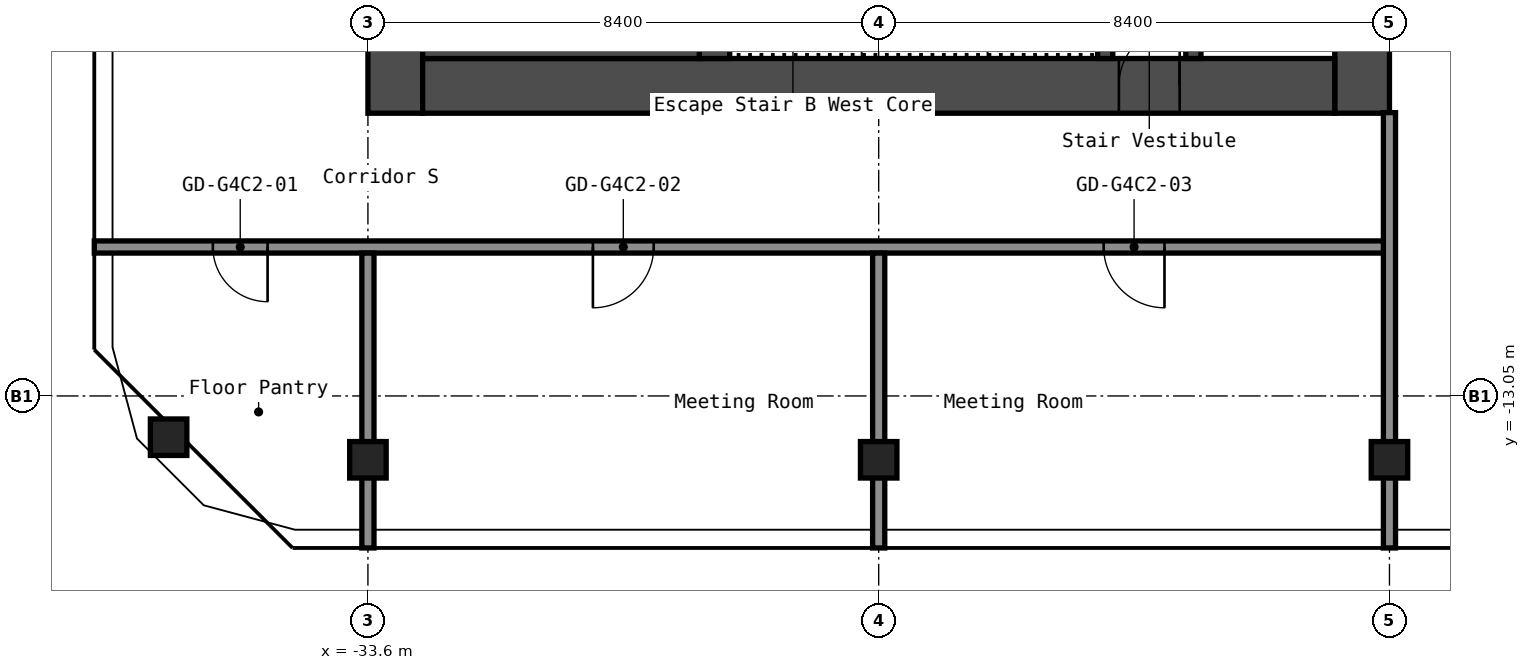
"""IFC4 building model, lengths in metres.
Left out: names, types, materials, properties, quantities, classifications, styles, units other than length and angle.
Written with IfcOpenShell. Run it as: python <this file> out.ifc"""

import sys

from ifc_helpers import new_model, si_unit, direction, frame, frame_2d, origin, origin_2d, place, context, subcontext, project, spatial, rectangle, hollow_rectangle, extrude, element, fill, save


model = new_model("IFC4")
c1 = context("Model", 3, precision=1e-05, world=origin(), true_north=direction((0.0, 1.0)))
c2 = subcontext(c1, "Body", "Model", "MODEL_VIEW")
j1 = project(units=[si_unit("LENGTHUNIT", "METRE"), si_unit("PLANEANGLEUNIT", "RADIAN")], contexts=[c1])
p1 = place(None, origin())
s1 = spatial("IfcSite", under=j1, at=p1, CompositionType="ELEMENT")
p2 = place(p1, origin())
s2 = spatial("IfcBuilding", under=s1, at=p2, CompositionType="ELEMENT")
p3 = place(p2, frame((0.0, 0.0, 225.0)))
s3 = spatial("IfcBuildingStorey", under=s2, at=p3, CompositionType="ELEMENT", Elevation=225.0)
for number, where, z_axis, x_axis in (
    (1, (-36.878, -13.729, 0.0), (0.0, 0.0, 1.0), (1.0, 0.0, 0.0)),
    (2, (-33.6, -14.1, 0.0), (0.0, 0.0, 1.0), (1.0, 0.0, 0.0)),
    (3, (-25.2, -14.1, 0.0), (0.0, 0.0, 1.0), (1.0, 0.0, 0.0)),
    (4, (-16.8, -14.1, 0.0), (0.0, 0.0, 1.0), (1.0, 0.0, 0.0)),
):
    element("IfcColumn", number, at=place(p3, frame(where, z_axis=z_axis, x_axis=x_axis)), inside=s3, PredefinedType="COLUMN", context=c2, shape_type="SweptSolid", body=[
        extrude(hollow_rectangle(XDim=0.6, YDim=0.6, WallThickness=0.025, InnerFilletRadius=0.038, OuterFilletRadius=0.062, at=origin_2d()), origin(), (0.0, 0.0, 1.0), 2.9),
    ])
p4 = place(p3, frame((-17.25, -8.4, 0.0), z_axis=(0.0, 0.0, 1.0), x_axis=(0.0, 1.0, 0.0)))
e5 = element("IfcWall", 5, at=p4, inside=s3, PredefinedType="SHEAR", context=c2, shape_type="SweptSolid", body=[
    extrude(rectangle(XDim=16.8, YDim=0.9, at=frame_2d((8.4, 0.0))), origin(), (0.0, 0.0, 1.0), 2.9),
])
p5 = place(p4, frame((10.1, 0.0, 0.0)))
e6 = element("IfcOpeningElement", 6, at=p5, cuts=e5, PredefinedType="OPENING", context=c2, shape_type="SweptSolid", body=[
    extrude(rectangle(XDim=1.6, YDim=2.1, at=frame_2d((0.8, 1.05))), frame((0.0, 0.46, 0.0), z_axis=(0.0, -1.0, 0.0), x_axis=(1.0, 0.0, 0.0)), (0.0, 0.0, 1.0), 0.92),
])
p6 = place(p3, frame((-33.15, -8.4, 0.0), z_axis=(0.0, 0.0, 1.0), x_axis=(0.0, 1.0, 0.0)))
e7 = element("IfcWall", 7, at=p6, inside=s3, PredefinedType="SHEAR", context=c2, shape_type="SweptSolid", body=[
    extrude(rectangle(XDim=16.8, YDim=0.9, at=frame_2d((8.4, 0.0))), origin(), (0.0, 0.0, 1.0), 2.9),
])
p7 = place(p3, frame((-32.7, -7.95, 0.0), z_axis=(0.0, 0.0, 1.0), x_axis=(1.0, 0.0, 0.0)))
e8 = element("IfcWall", 8, at=p7, inside=s3, PredefinedType="SHEAR", context=c2, shape_type="SweptSolid", body=[
    extrude(rectangle(XDim=15.0, YDim=0.9, at=frame_2d((7.5, 0.0))), origin(), (0.0, 0.0, 1.0), 2.9),
])
p8 = place(p7, frame((11.45, 0.0, 0.0)))
e9 = element("IfcOpeningElement", 9, at=p8, cuts=e8, PredefinedType="OPENING", context=c2, shape_type="SweptSolid", body=[
    extrude(rectangle(XDim=1.0, YDim=2.1, at=frame_2d((0.5, 1.05))), frame((0.0, 0.46, 0.0), z_axis=(0.0, -1.0, 0.0), x_axis=(1.0, 0.0, 0.0)), (0.0, 0.0, 1.0), 0.92),
])
p9 = place(p3, frame((-20.025, -7.5, 0.0), z_axis=(0.0, 0.0, 1.0), x_axis=(0.0, 1.0, 0.0)))
e10 = element("IfcWall", 10, at=p9, inside=s3, PredefinedType="SHEAR", context=c2, shape_type="SweptSolid", body=[
    extrude(rectangle(XDim=6.3, YDim=0.25, at=frame_2d((3.15, 0.0))), origin(), (0.0, 0.0, 1.0), 2.9),
])
p10 = place(p9, frame((2.4, 0.0, 0.0)))
e11 = element("IfcOpeningElement", 11, at=p10, cuts=e10, PredefinedType="OPENING", context=c2, shape_type="SweptSolid", body=[
    extrude(rectangle(XDim=1.0, YDim=2.1, at=frame_2d((0.5, 1.05))), frame((0.0, 0.135, 0.0), z_axis=(0.0, -1.0, 0.0), x_axis=(1.0, 0.0, 0.0)), (0.0, 0.0, 1.0), 0.27),
])
p11 = place(p3, frame((-21.475, -7.5, 0.0), z_axis=(0.0, 0.0, 1.0), x_axis=(0.0, 1.0, 0.0)))
e12 = element("IfcWall", 12, at=p11, inside=s3, PredefinedType="SHEAR", context=c2, shape_type="SweptSolid", body=[
    extrude(rectangle(XDim=3.75, YDim=0.25, at=frame_2d((1.875, 0.0))), origin(), (0.0, 0.0, 1.0), 2.9),
])
p12 = place(p11, frame((1.3, 0.0, 0.0)))
e13 = element("IfcOpeningElement", 13, at=p12, cuts=e12, PredefinedType="OPENING", context=c2, shape_type="SweptSolid", body=[
    extrude(rectangle(XDim=1.2, YDim=2.1, at=frame_2d((0.6, 1.05))), frame((0.0, 0.135, 0.0), z_axis=(0.0, -1.0, 0.0), x_axis=(1.0, 0.0, 0.0)), (0.0, 0.0, 1.0), 0.27),
])
p13 = place(p3, frame((-27.9, -7.5, 0.0), z_axis=(0.0, 0.0, 1.0), x_axis=(0.0, 1.0, 0.0)))
e14 = element("IfcWall", 14, at=p13, inside=s3, PredefinedType="SHEAR", context=c2, shape_type="SweptSolid", body=[
    extrude(rectangle(XDim=3.75, YDim=0.5, at=frame_2d((1.875, 0.0))), origin(), (0.0, 0.0, 1.0), 2.9),
])
p14 = place(p3, frame((-32.7, -6.75, 0.0), z_axis=(0.0, 0.0, 1.0), x_axis=(1.0, 0.0, 0.0)))
e15 = element("IfcWall", 15, at=p14, inside=s3, PredefinedType="SHEAR", context=c2, shape_type="SweptSolid", body=[
    extrude(rectangle(XDim=4.55, YDim=1.5, at=frame_2d((2.275, 0.0))), origin(), (0.0, 0.0, 1.0), 2.9),
])
p15 = place(p3, frame((-38.1, -10.6, 0.0), z_axis=(0.0, 0.0, 1.0), x_axis=(1.0, 0.0, 0.0)))
e16 = element("IfcWall", 16, at=p15, inside=s3, PredefinedType="PARTITIONING", context=c2, shape_type="SweptSolid", body=[
    extrude(rectangle(XDim=21.3, YDim=0.2, at=frame_2d((10.65, 0.0))), origin(), (0.0, 0.0, 1.0), 2.9),
])
p16 = place(p15, frame((1.95, 0.0, 0.0)))
e17 = element("IfcOpeningElement", 17, at=p16, cuts=e16, PredefinedType="OPENING", context=c2, shape_type="SweptSolid", body=[
    extrude(rectangle(XDim=0.9, YDim=2.1, at=frame_2d((0.45, 1.05))), frame((0.0, 0.11, 0.0), z_axis=(0.0, -1.0, 0.0), x_axis=(1.0, 0.0, 0.0)), (0.0, 0.0, 1.0), 0.22),
])
p17 = place(p15, frame((8.2, 0.0, 0.0)))
e18 = element("IfcOpeningElement", 18, at=p17, cuts=e16, PredefinedType="OPENING", context=c2, shape_type="SweptSolid", body=[
    extrude(rectangle(XDim=1.0, YDim=2.1, at=frame_2d((0.5, 1.05))), frame((0.0, 0.11, 0.0), z_axis=(0.0, -1.0, 0.0), x_axis=(1.0, 0.0, 0.0)), (0.0, 0.0, 1.0), 0.22),
])
p18 = place(p15, frame((16.6, 0.0, 0.0)))
e19 = element("IfcOpeningElement", 19, at=p18, cuts=e16, PredefinedType="OPENING", context=c2, shape_type="SweptSolid", body=[
    extrude(rectangle(XDim=1.0, YDim=2.1, at=frame_2d((0.5, 1.05))), frame((0.0, 0.11, 0.0), z_axis=(0.0, -1.0, 0.0), x_axis=(1.0, 0.0, 0.0)), (0.0, 0.0, 1.0), 0.22),
])
for number, where, z_axis, x_axis in (
    (20, (-33.6, -15.55, 0.0), (0.0, 0.0, 1.0), (0.0, 1.0, 0.0)),
    (21, (-25.2, -15.55, 0.0), (0.0, 0.0, 1.0), (0.0, 1.0, 0.0)),
):
    element("IfcWall", number, at=place(p3, frame(where, z_axis=z_axis, x_axis=x_axis)), inside=s3, PredefinedType="PARTITIONING", context=c2, shape_type="SweptSolid", body=[
        extrude(rectangle(XDim=4.85, YDim=0.2, at=frame_2d((2.425, 0.0))), origin(), (0.0, 0.0, 1.0), 2.9),
    ])
p19 = place(p3, frame((-16.8, -15.55, 0.0), z_axis=(0.0, 0.0, 1.0), x_axis=(0.0, 1.0, 0.0)))
e22 = element("IfcWall", 22, at=p19, inside=s3, PredefinedType="PARTITIONING", context=c2, shape_type="SweptSolid", body=[
    extrude(rectangle(XDim=7.16, YDim=0.2, at=frame_2d((3.58, 0.0))), origin(), (0.0, 0.0, 1.0), 2.9),
])
p20 = place(p8, origin())
e23 = element("IfcDoor", 23, at=p20, inside=s3, OperationType="SINGLE_SWING_LEFT", PredefinedType="DOOR", context=c2, shape_type="SweptSolid", body=[
    extrude(rectangle(XDim=1.0, YDim=2.1, at=frame_2d((0.5, 1.05))), frame((0.0, 0.025, 0.0), z_axis=(0.0, -1.0, 0.0), x_axis=(1.0, 0.0, 0.0)), (0.0, 0.0, 1.0), 0.05),
])
fill(e9, e23)
p21 = place(p16, origin())
e24 = element("IfcDoor", 24, at=p21, inside=s3, OperationType="SINGLE_SWING_RIGHT", PredefinedType="DOOR", context=c2, shape_type="SweptSolid", body=[
    extrude(rectangle(XDim=0.9, YDim=2.1, at=frame_2d((0.45, 1.05))), frame((0.0, 0.025, 0.0), z_axis=(0.0, -1.0, 0.0), x_axis=(1.0, 0.0, 0.0)), (0.0, 0.0, 1.0), 0.05),
])
fill(e17, e24)
p22 = place(p17, origin())
e25 = element("IfcDoor", 25, at=p22, inside=s3, OperationType="SINGLE_SWING_LEFT", PredefinedType="DOOR", context=c2, shape_type="SweptSolid", body=[
    extrude(rectangle(XDim=1.0, YDim=2.1, at=frame_2d((0.5, 1.05))), frame((0.0, 0.025, 0.0), z_axis=(0.0, -1.0, 0.0), x_axis=(1.0, 0.0, 0.0)), (0.0, 0.0, 1.0), 0.05),
])
fill(e18, e25)
p23 = place(p18, origin())
e26 = element("IfcDoor", 26, at=p23, inside=s3, OperationType="SINGLE_SWING_RIGHT", PredefinedType="DOOR", context=c2, shape_type="SweptSolid", body=[
    extrude(rectangle(XDim=1.0, YDim=2.1, at=frame_2d((0.5, 1.05))), frame((0.0, 0.025, 0.0), z_axis=(0.0, -1.0, 0.0), x_axis=(1.0, 0.0, 0.0)), (0.0, 0.0, 1.0), 0.05),
])
fill(e19, e26)
save(model, sys.argv[1])
